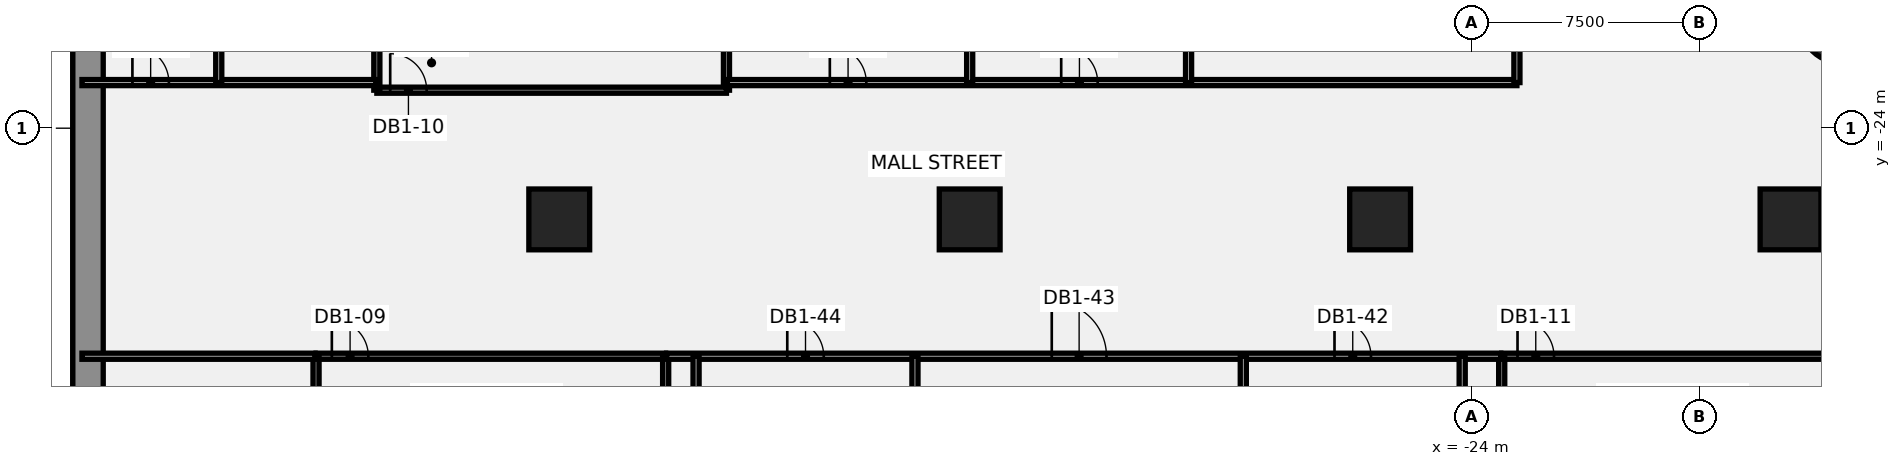
"""IFC4 building model, lengths in metres.
Left out: names, types, materials, properties, quantities, classifications, styles, units other than length and angle.
Written with IfcOpenShell. Run it as: python <this file> out.ifc"""

import sys

from ifc_helpers import new_model, si_unit, direction, frame, frame_2d, origin, origin_2d, place, context, subcontext, project, spatial, rectangle, circle, extrude, element, fill, save


model = new_model("IFC4")
c1 = context("Model", 3, precision=1e-05, world=origin(), true_north=direction((0.0, 1.0)))
c2 = subcontext(c1, "Body", "Model", "MODEL_VIEW")
j1 = project(units=[si_unit("LENGTHUNIT", "METRE"), si_unit("PLANEANGLEUNIT", "RADIAN")], contexts=[c1])
p1 = place(None, origin())
s1 = spatial("IfcSite", under=j1, at=p1, CompositionType="ELEMENT")
p2 = place(p1, origin())
s2 = spatial("IfcBuilding", under=s1, at=p2, CompositionType="ELEMENT")
p3 = place(p2, frame((0.0, 0.0, -7.0)))
s3 = spatial("IfcBuildingStorey", under=s2, at=p3, CompositionType="ELEMENT", Elevation=-7.0)
p4 = place(p3, frame((-69.5, -53.931, -0.45), z_axis=(0.0, 0.0, 1.0), x_axis=(0.0, 1.0, 0.0)))
e1 = element("IfcWall", 1, at=p4, inside=s3, PredefinedType="SOLIDWALL", context=c2, shape_type="SweptSolid", body=[
    extrude(rectangle(XDim=107.863, YDim=1.0, at=frame_2d((53.931, 0.0))), origin(), (0.0, 0.0, 1.0), 6.9),
])
p5 = place(p3, frame((-11.86, -20.543, -0.45), z_axis=(0.0, 0.0, 1.0), x_axis=(1.0, 0.0, 0.0)))
e2 = element("IfcColumn", 2, at=p5, inside=s3, PredefinedType="COLUMN", context=c2, shape_type="SweptSolid", body=[
    extrude(circle(Radius=1.3, at=origin_2d()), origin(), (0.0, 0.0, 1.0), 6.9),
])
for number, where, z_axis, x_axis in (
    (3, (-54.0, -27.0, -0.45), (0.0, 0.0, 1.0), (1.0, 0.0, 0.0)),
    (4, (-40.5, -27.0, -0.45), (0.0, 0.0, 1.0), (1.0, 0.0, 0.0)),
    (5, (-27.0, -27.0, -0.45), (0.0, 0.0, 1.0), (1.0, 0.0, 0.0)),
    (6, (-13.5, -27.0, -0.45), (0.0, 0.0, 1.0), (1.0, 0.0, 0.0)),
):
    element("IfcColumn", number, at=place(p3, frame(where, z_axis=z_axis, x_axis=x_axis)), inside=s3, PredefinedType="COLUMN", context=c2, shape_type="SweptSolid", body=[
        extrude(rectangle(XDim=2.0, YDim=2.0, at=origin_2d()), origin(), (0.0, 0.0, 1.0), 6.9),
    ])
p6 = place(p3, frame((-62.0, -31.5, 0.0), z_axis=(0.0, 0.0, 1.0), x_axis=(1.0, 0.0, 0.0)))
e7 = element("IfcWall", 7, at=p6, inside=s3, PredefinedType="PARTITIONING", context=c2, shape_type="SweptSolid", body=[
    extrude(rectangle(XDim=11.5, YDim=0.2, at=frame_2d((5.75, 0.0))), origin(), (0.0, 0.0, 1.0), 6.45),
])
p7 = place(p6, frame((0.52, 0.0, 0.0)))
e8 = element("IfcOpeningElement", 8, at=p7, cuts=e7, PredefinedType="OPENING", context=c2, shape_type="SweptSolid", body=[
    extrude(rectangle(XDim=1.2, YDim=2.1, at=frame_2d((0.6, 1.05))), frame((0.0, 0.11, 0.0), z_axis=(0.0, -1.0, 0.0), x_axis=(1.0, 0.0, 0.0)), (0.0, 0.0, 1.0), 0.22),
])
for number, where, z_axis, x_axis in (
    (9, (-50.5, -35.4, 0.0), (0.0, 0.0, 1.0), (0.0, 1.0, 0.0)),
    (10, (-62.0, -35.4, 0.0), (0.0, 0.0, 1.0), (0.0, 1.0, 0.0)),
    (11, (-48.5, -22.75, 0.0), (0.0, 0.0, 1.0), (0.0, 1.0, 0.0)),
):
    element("IfcWall", number, at=place(p3, frame(where, z_axis=z_axis, x_axis=x_axis)), inside=s3, PredefinedType="PARTITIONING", context=c2, shape_type="SweptSolid", body=[
        extrude(rectangle(XDim=3.9, YDim=0.2, at=frame_2d((1.95, 0.0))), origin(), (0.0, 0.0, 1.0), 6.45),
    ])
p8 = place(p3, frame((-60.0, -22.75, 0.0), z_axis=(0.0, 0.0, 1.0), x_axis=(1.0, 0.0, 0.0)))
e12 = element("IfcWall", 12, at=p8, inside=s3, PredefinedType="PARTITIONING", context=c2, shape_type="SweptSolid", body=[
    extrude(rectangle(XDim=11.5, YDim=0.2, at=frame_2d((5.75, 0.0))), origin(), (0.0, 0.0, 1.0), 6.45),
])
p9 = place(p8, frame((0.439, 0.0, 0.0)))
e13 = element("IfcOpeningElement", 13, at=p9, cuts=e12, PredefinedType="OPENING", context=c2, shape_type="SweptSolid", body=[
    extrude(rectangle(XDim=1.2, YDim=2.1, at=frame_2d((0.6, 1.05))), frame((0.0, 0.11, 0.0), z_axis=(0.0, -1.0, 0.0), x_axis=(1.0, 0.0, 0.0)), (0.0, 0.0, 1.0), 0.22),
])
p10 = place(p3, frame((-60.0, -22.75, 0.0), z_axis=(0.0, 0.0, 1.0), x_axis=(0.0, 1.0, 0.0)))
e14 = element("IfcWall", 14, at=p10, inside=s3, PredefinedType="PARTITIONING", context=c2, shape_type="SweptSolid", body=[
    extrude(rectangle(XDim=3.9, YDim=0.2, at=frame_2d((1.95, 0.0))), origin(), (0.0, 0.0, 1.0), 6.45),
])
p11 = place(p3, frame((-23.0, -31.5, 0.0), z_axis=(0.0, 0.0, 1.0), x_axis=(1.0, 0.0, 0.0)))
e15 = element("IfcWall", 15, at=p11, inside=s3, PredefinedType="PARTITIONING", context=c2, shape_type="SweptSolid", body=[
    extrude(rectangle(XDim=11.5, YDim=0.2, at=frame_2d((5.75, 0.0))), origin(), (0.0, 0.0, 1.0), 6.45),
])
p12 = place(p11, frame((0.52, 0.0, 0.0)))
e16 = element("IfcOpeningElement", 16, at=p12, cuts=e15, PredefinedType="OPENING", context=c2, shape_type="SweptSolid", body=[
    extrude(rectangle(XDim=1.2, YDim=2.1, at=frame_2d((0.6, 1.05))), frame((0.0, 0.11, 0.0), z_axis=(0.0, -1.0, 0.0), x_axis=(1.0, 0.0, 0.0)), (0.0, 0.0, 1.0), 0.22),
])
p13 = place(p3, frame((-23.0, -35.4, 0.0), z_axis=(0.0, 0.0, 1.0), x_axis=(0.0, 1.0, 0.0)))
e17 = element("IfcWall", 17, at=p13, inside=s3, PredefinedType="PARTITIONING", context=c2, shape_type="SweptSolid", body=[
    extrude(rectangle(XDim=3.9, YDim=0.2, at=frame_2d((1.95, 0.0))), origin(), (0.0, 0.0, 1.0), 6.45),
])
p14 = place(p3, frame((-69.699, -31.5, 0.0), z_axis=(0.0, 0.0, 1.0), x_axis=(1.0, 0.0, 0.0)))
e18 = element("IfcWall", 18, at=p14, inside=s3, PredefinedType="PARTITIONING", context=c2, shape_type="SweptSolid", body=[
    extrude(rectangle(XDim=7.669, YDim=0.2, at=frame_2d((3.834, 0.0))), origin(), (0.0, 0.0, 1.0), 6.45),
])
p15 = place(p3, frame((-69.699, -22.5, 0.0), z_axis=(0.0, 0.0, 1.0), x_axis=(1.0, 0.0, 0.0)))
e19 = element("IfcWall", 19, at=p15, inside=s3, PredefinedType="PARTITIONING", context=c2, shape_type="SweptSolid", body=[
    extrude(rectangle(XDim=9.669, YDim=0.2, at=frame_2d((4.834, 0.0))), origin(), (0.0, 0.0, 1.0), 6.45),
])
p16 = place(p15, frame((1.659, 0.0, 0.0)))
e20 = element("IfcOpeningElement", 20, at=p16, cuts=e19, PredefinedType="OPENING", context=c2, shape_type="SweptSolid", body=[
    extrude(rectangle(XDim=1.2, YDim=2.1, at=frame_2d((0.6, 1.05))), frame((0.0, 0.11, 0.0), z_axis=(0.0, -1.0, 0.0), x_axis=(1.0, 0.0, 0.0)), (0.0, 0.0, 1.0), 0.22),
])
p17 = place(p3, frame((-65.2, -22.5, 0.0), z_axis=(0.0, 0.0, 1.0), x_axis=(0.0, 1.0, 0.0)))
e21 = element("IfcWall", 21, at=p17, inside=s3, PredefinedType="PARTITIONING", context=c2, shape_type="SweptSolid", body=[
    extrude(rectangle(XDim=9.0, YDim=0.2, at=frame_2d((4.5, 0.0))), origin(), (0.0, 0.0, 1.0), 6.45),
])
p18 = place(p3, frame((-50.47, -31.5, 0.0), z_axis=(0.0, 0.0, 1.0), x_axis=(1.0, 0.0, 0.0)))
e22 = element("IfcWall", 22, at=p18, inside=s3, PredefinedType="PARTITIONING", context=c2, shape_type="SweptSolid", body=[
    extrude(rectangle(XDim=27.44, YDim=0.2, at=frame_2d((13.72, 0.0))), origin(), (0.0, 0.0, 1.0), 6.45),
])
p19 = place(p18, frame((21.97, 0.0, 0.0)))
e23 = element("IfcOpeningElement", 23, at=p19, cuts=e22, PredefinedType="OPENING", context=c2, shape_type="SweptSolid", body=[
    extrude(rectangle(XDim=1.2, YDim=2.1, at=frame_2d((0.6, 1.05))), frame((0.0, 0.11, 0.0), z_axis=(0.0, -1.0, 0.0), x_axis=(1.0, 0.0, 0.0)), (0.0, 0.0, 1.0), 0.22),
])
p20 = place(p18, frame((12.67, 0.0, 0.0)))
e24 = element("IfcOpeningElement", 24, at=p20, cuts=e22, PredefinedType="OPENING", context=c2, shape_type="SweptSolid", body=[
    extrude(rectangle(XDim=1.8, YDim=2.1, at=frame_2d((0.9, 1.05))), frame((0.0, 0.11, 0.0), z_axis=(0.0, -1.0, 0.0), x_axis=(1.0, 0.0, 0.0)), (0.0, 0.0, 1.0), 0.22),
])
p21 = place(p18, frame((3.97, 0.0, 0.0)))
e25 = element("IfcOpeningElement", 25, at=p21, cuts=e22, PredefinedType="OPENING", context=c2, shape_type="SweptSolid", body=[
    extrude(rectangle(XDim=1.2, YDim=2.1, at=frame_2d((0.6, 1.05))), frame((0.0, 0.11, 0.0), z_axis=(0.0, -1.0, 0.0), x_axis=(1.0, 0.0, 0.0)), (0.0, 0.0, 1.0), 0.22),
])
p22 = place(p3, frame((-49.5, -40.5, 0.0), z_axis=(0.0, 0.0, 1.0), x_axis=(0.0, 1.0, 0.0)))
e26 = element("IfcWall", 26, at=p22, inside=s3, PredefinedType="PARTITIONING", context=c2, shape_type="SweptSolid", body=[
    extrude(rectangle(XDim=9.0, YDim=0.2, at=frame_2d((4.5, 0.0))), origin(), (0.0, 0.0, 1.0), 6.45),
])
p23 = place(p3, frame((-48.47, -22.5, 0.0), z_axis=(0.0, 0.0, 1.0), x_axis=(1.0, 0.0, 0.0)))
e27 = element("IfcWall", 27, at=p23, inside=s3, PredefinedType="PARTITIONING", context=c2, shape_type="SweptSolid", body=[
    extrude(rectangle(XDim=25.97, YDim=0.2, at=frame_2d((12.985, 0.0))), origin(), (0.0, 0.0, 1.0), 6.45),
])
p24 = place(p23, frame((10.98, 0.0, 0.0)))
e28 = element("IfcOpeningElement", 28, at=p24, cuts=e27, PredefinedType="OPENING", context=c2, shape_type="SweptSolid", body=[
    extrude(rectangle(XDim=1.2, YDim=2.1, at=frame_2d((0.6, 1.05))), frame((0.0, 0.11, 0.0), z_axis=(0.0, -1.0, 0.0), x_axis=(1.0, 0.0, 0.0)), (0.0, 0.0, 1.0), 0.22),
])
p25 = place(p23, frame((3.37, 0.0, 0.0)))
e29 = element("IfcOpeningElement", 29, at=p25, cuts=e27, PredefinedType="OPENING", context=c2, shape_type="SweptSolid", body=[
    extrude(rectangle(XDim=1.2, YDim=2.1, at=frame_2d((0.6, 1.05))), frame((0.0, 0.11, 0.0), z_axis=(0.0, -1.0, 0.0), x_axis=(1.0, 0.0, 0.0)), (0.0, 0.0, 1.0), 0.22),
])
for number, where, z_axis, x_axis in (
    (30, (-42.3, -40.5, 0.0), (0.0, 0.0, 1.0), (0.0, 1.0, 0.0)),
    (31, (-40.5, -22.5, 0.0), (0.0, 0.0, 1.0), (0.0, 1.0, 0.0)),
    (32, (-22.5, -22.5, 0.0), (0.0, 0.0, 1.0), (0.0, 1.0, 0.0)),
    (33, (-33.3, -22.5, 0.0), (0.0, 0.0, 1.0), (0.0, 1.0, 0.0)),
    (34, (-31.5, -40.5, 0.0), (0.0, 0.0, 1.0), (0.0, 1.0, 0.0)),
    (35, (-24.3, -40.5, 0.0), (0.0, 0.0, 1.0), (0.0, 1.0, 0.0)),
):
    element("IfcWall", number, at=place(p3, frame(where, z_axis=z_axis, x_axis=x_axis)), inside=s3, PredefinedType="PARTITIONING", context=c2, shape_type="SweptSolid", body=[
        extrude(rectangle(XDim=9.0, YDim=0.2, at=frame_2d((4.5, 0.0))), origin(), (0.0, 0.0, 1.0), 6.45),
    ])
p26 = place(p7, origin())
e36 = element("IfcDoor", 36, at=p26, inside=s3, OperationType="SINGLE_SWING_LEFT", PredefinedType="DOOR", context=c2, shape_type="SweptSolid", body=[
    extrude(rectangle(XDim=1.2, YDim=2.1, at=frame_2d((0.6, 1.05))), frame((0.0, 0.025, 0.0), z_axis=(0.0, -1.0, 0.0), x_axis=(1.0, 0.0, 0.0)), (0.0, 0.0, 1.0), 0.05),
])
fill(e8, e36)
p27 = place(p9, origin())
e37 = element("IfcDoor", 37, at=p27, inside=s3, OperationType="SINGLE_SWING_RIGHT", PredefinedType="DOOR", context=c2, shape_type="SweptSolid", body=[
    extrude(rectangle(XDim=1.2, YDim=2.1, at=frame_2d((0.6, 1.05))), frame((0.0, 0.025, 0.0), z_axis=(0.0, -1.0, 0.0), x_axis=(1.0, 0.0, 0.0)), (0.0, 0.0, 1.0), 0.05),
])
fill(e13, e37)
p28 = place(p12, origin())
e38 = element("IfcDoor", 38, at=p28, inside=s3, OperationType="SINGLE_SWING_LEFT", PredefinedType="DOOR", context=c2, shape_type="SweptSolid", body=[
    extrude(rectangle(XDim=1.2, YDim=2.1, at=frame_2d((0.6, 1.05))), frame((0.0, 0.025, 0.0), z_axis=(0.0, -1.0, 0.0), x_axis=(1.0, 0.0, 0.0)), (0.0, 0.0, 1.0), 0.05),
])
fill(e16, e38)
p29 = place(p24, origin())
e39 = element("IfcDoor", 39, at=p29, inside=s3, OperationType="SINGLE_SWING_RIGHT", PredefinedType="DOOR", context=c2, shape_type="SweptSolid", body=[
    extrude(rectangle(XDim=1.2, YDim=2.1, at=frame_2d((0.6, 1.05))), frame((0.0, 0.025, 0.0), z_axis=(0.0, -1.0, 0.0), x_axis=(1.0, 0.0, 0.0)), (0.0, 0.0, 1.0), 0.05),
])
fill(e28, e39)
p30 = place(p25, origin())
e40 = element("IfcDoor", 40, at=p30, inside=s3, OperationType="SINGLE_SWING_RIGHT", PredefinedType="DOOR", context=c2, shape_type="SweptSolid", body=[
    extrude(rectangle(XDim=1.2, YDim=2.1, at=frame_2d((0.6, 1.05))), frame((0.0, 0.025, 0.0), z_axis=(0.0, -1.0, 0.0), x_axis=(1.0, 0.0, 0.0)), (0.0, 0.0, 1.0), 0.05),
])
fill(e29, e40)
p31 = place(p16, origin())
e41 = element("IfcDoor", 41, at=p31, inside=s3, OperationType="SINGLE_SWING_RIGHT", PredefinedType="DOOR", context=c2, shape_type="SweptSolid", body=[
    extrude(rectangle(XDim=1.2, YDim=2.1, at=frame_2d((0.6, 1.05))), frame((0.0, 0.025, 0.0), z_axis=(0.0, -1.0, 0.0), x_axis=(1.0, 0.0, 0.0)), (0.0, 0.0, 1.0), 0.05),
])
fill(e20, e41)
p32 = place(p19, origin())
e42 = element("IfcDoor", 42, at=p32, inside=s3, OperationType="SINGLE_SWING_RIGHT", PredefinedType="DOOR", context=c2, shape_type="SweptSolid", body=[
    extrude(rectangle(XDim=1.2, YDim=2.1, at=frame_2d((0.6, 1.05))), frame((0.0, 0.025, 0.0), z_axis=(0.0, -1.0, 0.0), x_axis=(1.0, 0.0, 0.0)), (0.0, 0.0, 1.0), 0.05),
])
fill(e23, e42)
p33 = place(p20, origin())
e43 = element("IfcDoor", 43, at=p33, inside=s3, OperationType="SINGLE_SWING_LEFT", PredefinedType="DOOR", context=c2, shape_type="SweptSolid", body=[
    extrude(rectangle(XDim=1.8, YDim=2.1, at=frame_2d((0.9, 1.05))), frame((0.0, 0.025, 0.0), z_axis=(0.0, -1.0, 0.0), x_axis=(1.0, 0.0, 0.0)), (0.0, 0.0, 1.0), 0.05),
])
fill(e24, e43)
p34 = place(p21, origin())
e44 = element("IfcDoor", 44, at=p34, inside=s3, OperationType="SINGLE_SWING_RIGHT", PredefinedType="DOOR", context=c2, shape_type="SweptSolid", body=[
    extrude(rectangle(XDim=1.2, YDim=2.1, at=frame_2d((0.6, 1.05))), frame((0.0, 0.025, 0.0), z_axis=(0.0, -1.0, 0.0), x_axis=(1.0, 0.0, 0.0)), (0.0, 0.0, 1.0), 0.05),
])
fill(e25, e44)
save(model, sys.argv[1])
